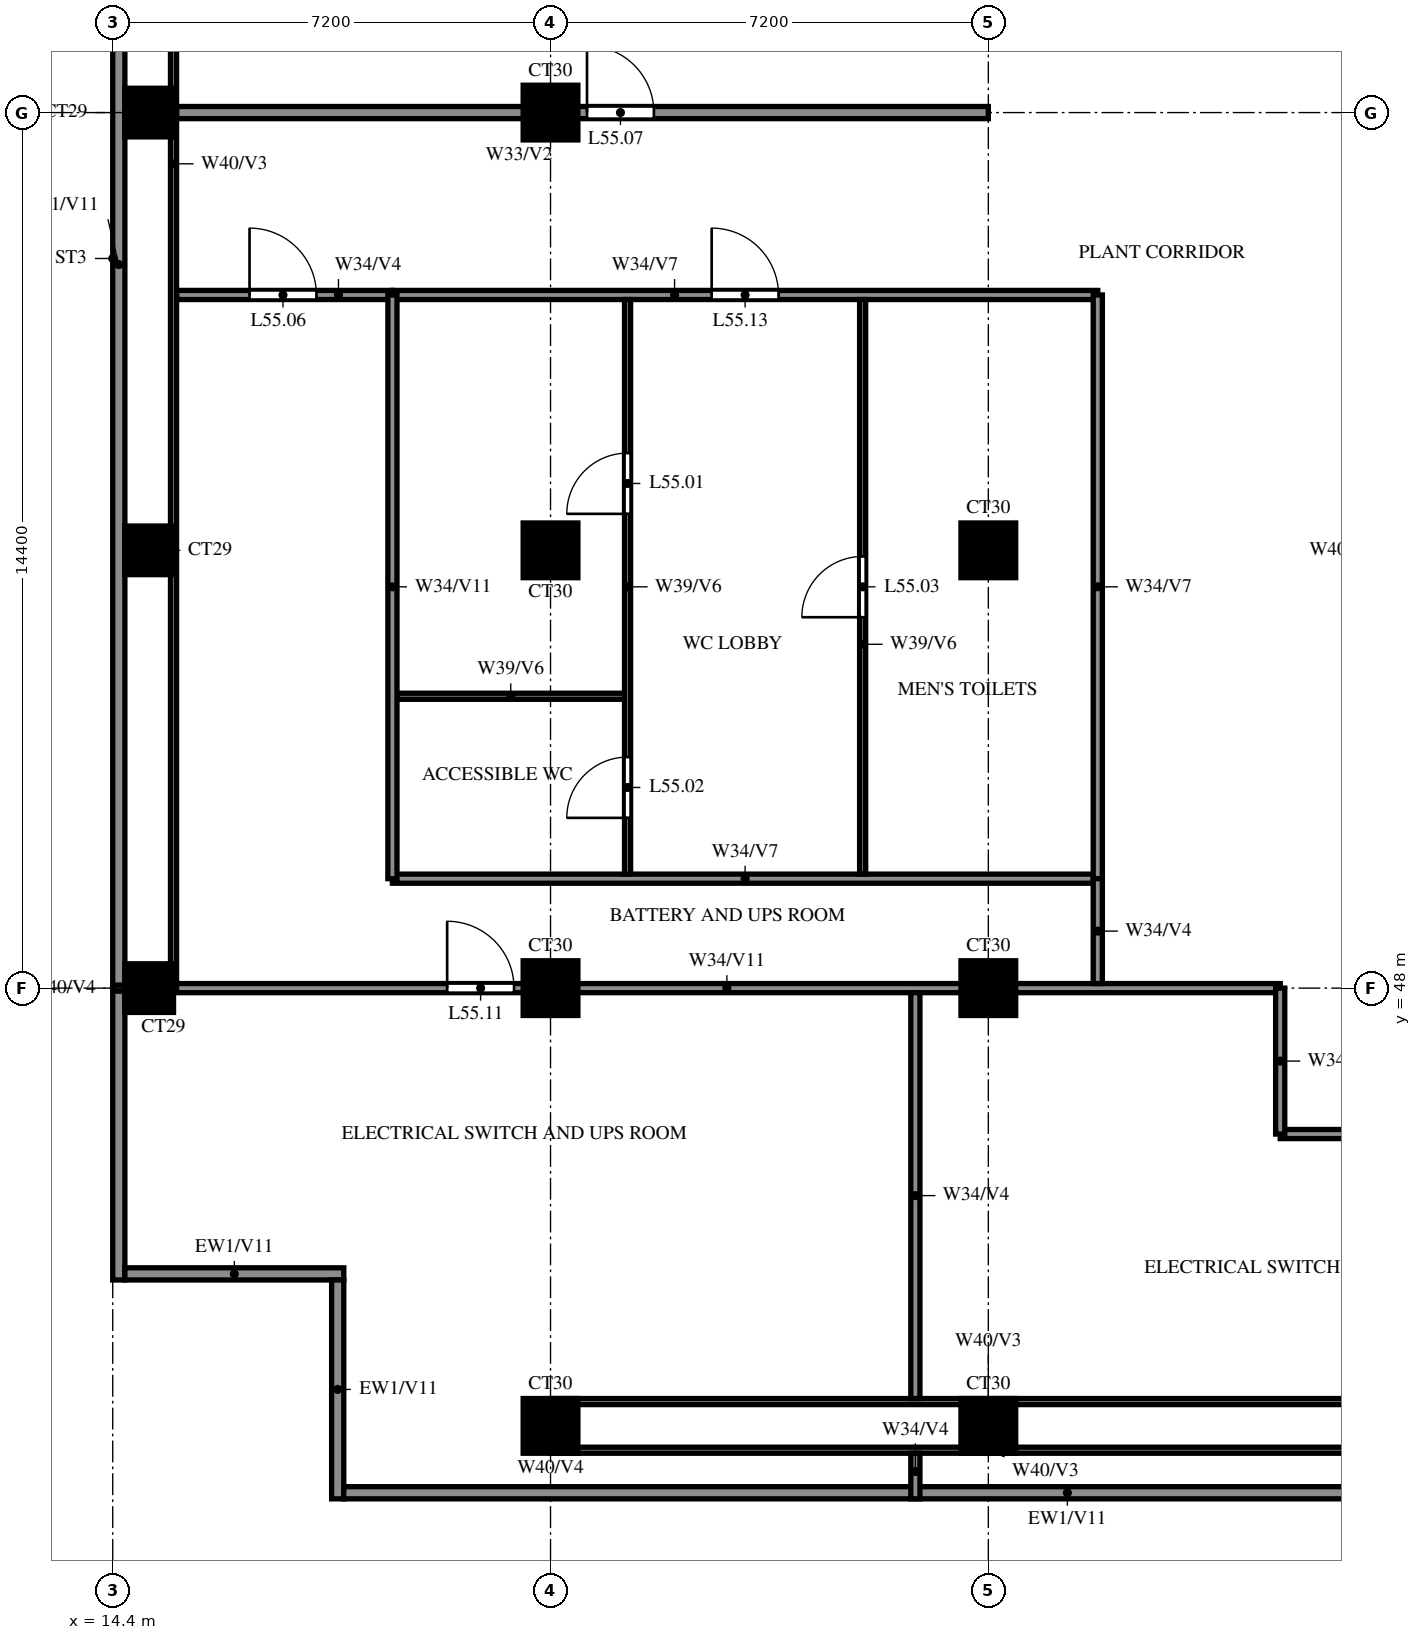
"""IFC4 building model, lengths in metres.
Left out: names, types, materials, properties, quantities, classifications, styles, units other than length and angle.
Written with IfcOpenShell. Run it as: python <this file> out.ifc"""

import sys

from ifc_helpers import new_model, si_unit, direction, frame, frame_2d, origin, origin_2d, place, context, subcontext, project, spatial, rectangle, extrude, source, transform, mapped, element, fill, save


model = new_model("IFC4")
c1 = context("Model", 3, precision=1e-05, world=origin(), true_north=direction((0.0, 1.0)))
c2 = subcontext(c1, "Body", "Model", "MODEL_VIEW")
j1 = project(units=[si_unit("LENGTHUNIT", "METRE"), si_unit("PLANEANGLEUNIT", "RADIAN")], contexts=[c1])
p1 = place(None, origin())
s1 = spatial("IfcSite", under=j1, at=p1, CompositionType="ELEMENT")
p2 = place(p1, origin())
s2 = spatial("IfcBuilding", under=s1, at=p2, CompositionType="ELEMENT")
p3 = place(p2, frame((0.0, 0.0, 206.0)))
s3 = spatial("IfcBuildingStorey", under=s2, at=p3, CompositionType="ELEMENT", Elevation=206.0)
m1 = source(origin(), c2, "Body", "SweptSolid", [
    extrude(rectangle(XDim=0.9, YDim=0.9, at=origin_2d()), origin(), (0.0, 0.0, 1.0), 5.22),
])
for number, where, z_axis, x_axis in (
    (1, (21.6, 40.8, 0.0), (0.0, 0.0, 1.0), (1.0, 0.0, 0.0)),
    (2, (28.8, 40.8, 0.0), (0.0, 0.0, 1.0), (1.0, 0.0, 0.0)),
):
    element("IfcColumn", number, at=place(p3, frame(where, z_axis=z_axis, x_axis=x_axis)), inside=s3, PredefinedType="COLUMN", context=c2, shape_type="MappedRepresentation", body=[
        mapped(m1, transform((0.0, 0.0, 0.0))),
    ])
m2 = source(origin(), c2, "Body", "SweptSolid", [
    extrude(rectangle(XDim=0.8, YDim=0.8, at=origin_2d()), origin(), (0.0, 0.0, 1.0), 5.22),
])
p4 = place(p3, frame((15.0, 48.0, 0.0), z_axis=(0.0, 0.0, 1.0), x_axis=(1.0, 0.0, 0.0)))
e3 = element("IfcColumn", 3, at=p4, inside=s3, PredefinedType="COLUMN", context=c2, shape_type="MappedRepresentation", body=[
    mapped(m2, transform((0.0, 0.0, 0.0))),
])
for number, where, z_axis, x_axis in (
    (4, (21.6, 48.0, 0.0), (0.0, 0.0, 1.0), (1.0, 0.0, 0.0)),
    (5, (28.8, 48.0, 0.0), (0.0, 0.0, 1.0), (1.0, 0.0, 0.0)),
):
    element("IfcColumn", number, at=place(p3, frame(where, z_axis=z_axis, x_axis=x_axis)), inside=s3, PredefinedType="COLUMN", context=c2, shape_type="MappedRepresentation", body=[
        mapped(m1, transform((0.0, 0.0, 0.0))),
    ])
p5 = place(p3, frame((15.0, 55.2, 0.0), z_axis=(0.0, 0.0, 1.0), x_axis=(1.0, 0.0, 0.0)))
e6 = element("IfcColumn", 6, at=p5, inside=s3, PredefinedType="COLUMN", context=c2, shape_type="MappedRepresentation", body=[
    mapped(m2, transform((0.0, 0.0, 0.0))),
])
for number, where, z_axis, x_axis in (
    (7, (21.6, 55.2, 0.0), (0.0, 0.0, 1.0), (1.0, 0.0, 0.0)),
    (8, (28.8, 55.2, 0.0), (0.0, 0.0, 1.0), (1.0, 0.0, 0.0)),
):
    element("IfcColumn", number, at=place(p3, frame(where, z_axis=z_axis, x_axis=x_axis)), inside=s3, PredefinedType="COLUMN", context=c2, shape_type="MappedRepresentation", body=[
        mapped(m1, transform((0.0, 0.0, 0.0))),
    ])
p6 = place(p3, frame((15.0, 62.4, 0.0), z_axis=(0.0, 0.0, 1.0), x_axis=(1.0, 0.0, 0.0)))
e9 = element("IfcColumn", 9, at=p6, inside=s3, PredefinedType="COLUMN", context=c2, shape_type="MappedRepresentation", body=[
    mapped(m2, transform((0.0, 0.0, 0.0))),
])
p7 = place(p3, frame((21.6, 62.4, 0.0), z_axis=(0.0, 0.0, 1.0), x_axis=(1.0, 0.0, 0.0)))
e10 = element("IfcColumn", 10, at=p7, inside=s3, PredefinedType="COLUMN", context=c2, shape_type="MappedRepresentation", body=[
    mapped(m1, transform((0.0, 0.0, 0.0))),
])
p8 = place(p3, frame((14.5, 76.6, 0.0), z_axis=(0.0, 0.0, 1.0), x_axis=(0.0, -1.0, 0.0)))
e11 = element("IfcWall", 11, at=p8, inside=s3, PredefinedType="SOLIDWALL", context=c2, shape_type="SweptSolid", body=[
    extrude(rectangle(XDim=33.4, YDim=0.2, at=frame_2d((16.7, 0.0))), origin(), (0.0, 0.0, 1.0), 5.22),
])
for number, where, z_axis, x_axis in (
    (12, (14.6, 43.3, 0.0), (0.0, 0.0, 1.0), (1.0, 0.0, 0.0)),
    (13, (18.1, 43.2, 0.0), (0.0, 0.0, 1.0), (0.0, -1.0, 0.0)),
):
    element("IfcWall", number, at=place(p3, frame(where, z_axis=z_axis, x_axis=x_axis)), inside=s3, PredefinedType="SOLIDWALL", context=c2, shape_type="SweptSolid", body=[
        extrude(rectangle(XDim=3.6, YDim=0.2, at=frame_2d((1.8, 0.0))), origin(), (0.0, 0.0, 1.0), 5.22),
    ])
p9 = place(p3, frame((18.2, 39.7, 0.0), z_axis=(0.0, 0.0, 1.0), x_axis=(1.0, 0.0, 0.0)))
e14 = element("IfcWall", 14, at=p9, inside=s3, PredefinedType="SOLIDWALL", context=c2, shape_type="SweptSolid", body=[
    extrude(rectangle(XDim=23.8, YDim=0.2, at=frame_2d((11.9, 0.0))), origin(), (0.0, 0.0, 1.0), 5.22),
])
for number, where, z_axis, x_axis in (
    (15, (21.6, 40.4, 0.0), (0.0, 0.0, 1.0), (1.0, 0.0, 0.0)),
    (16, (21.6, 41.2, 0.0), (0.0, 0.0, 1.0), (1.0, 0.0, 0.0)),
):
    element("IfcWall", number, at=place(p3, frame(where, z_axis=z_axis, x_axis=x_axis)), inside=s3, PredefinedType="PARTITIONING", context=c2, shape_type="SweptSolid", body=[
        extrude(rectangle(XDim=14.4, YDim=0.1, at=frame_2d((7.2, 0.0))), origin(), (0.0, 0.0, 1.0), 3.72),
    ])
p10 = place(p3, frame((33.6, 45.6, 0.0), z_axis=(0.0, 0.0, 1.0), x_axis=(1.0, 0.0, 0.0)))
e17 = element("IfcWall", 17, at=p10, inside=s3, PredefinedType="PARTITIONING", context=c2, shape_type="SweptSolid", body=[
    extrude(rectangle(XDim=7.2, YDim=0.15, at=frame_2d((3.6, 0.0))), origin(), (0.0, 0.0, 1.0), 5.22),
])
p11 = place(p10, frame((3.05, 0.0, 0.0)))
e18 = element("IfcOpeningElement", 18, at=p11, cuts=e17, PredefinedType="OPENING", context=c2, shape_type="SweptSolid", body=[
    extrude(rectangle(XDim=1.1, YDim=2.1, at=frame_2d((0.55, 1.05))), frame((0.0, 0.085, 0.0), z_axis=(0.0, -1.0, 0.0), x_axis=(1.0, 0.0, 0.0)), (0.0, 0.0, 1.0), 0.17),
])
p12 = place(p10, frame((1.85, 0.0, 0.0)))
e19 = element("IfcOpeningElement", 19, at=p12, cuts=e17, PredefinedType="OPENING", context=c2, shape_type="SweptSolid", body=[
    extrude(rectangle(XDim=1.1, YDim=2.1, at=frame_2d((0.55, 1.05))), frame((0.0, 0.085, 0.0), z_axis=(0.0, -1.0, 0.0), x_axis=(1.0, 0.0, 0.0)), (0.0, 0.0, 1.0), 0.17),
])
p13 = place(p3, frame((14.4, 48.0, 0.0), z_axis=(0.0, 0.0, 1.0), x_axis=(1.0, 0.0, 0.0)))
e20 = element("IfcWall", 20, at=p13, inside=s3, PredefinedType="PARTITIONING", context=c2, shape_type="SweptSolid", body=[
    extrude(rectangle(XDim=1.0, YDim=0.1, at=frame_2d((0.5, 0.0))), origin(), (0.0, 0.0, 1.0), 5.22),
])
p14 = place(p3, frame((15.4, 48.0, 0.0), z_axis=(0.0, 0.0, 1.0), x_axis=(1.0, 0.0, 0.0)))
e21 = element("IfcWall", 21, at=p14, inside=s3, PredefinedType="PARTITIONING", context=c2, shape_type="SweptSolid", body=[
    extrude(rectangle(XDim=18.2, YDim=0.15, at=frame_2d((9.1, 0.0))), origin(), (0.0, 0.0, 1.0), 3.72),
])
p15 = place(p14, frame((4.5, 0.0, 0.0)))
e22 = element("IfcOpeningElement", 22, at=p15, cuts=e21, PredefinedType="OPENING", context=c2, shape_type="SweptSolid", body=[
    extrude(rectangle(XDim=1.1, YDim=2.1, at=frame_2d((0.55, 1.05))), frame((0.0, 0.085, 0.0), z_axis=(0.0, -1.0, 0.0), x_axis=(1.0, 0.0, 0.0)), (0.0, 0.0, 1.0), 0.17),
])
p16 = place(p3, frame((19.0, 49.8, 0.0), z_axis=(0.0, 0.0, 1.0), x_axis=(1.0, 0.0, 0.0)))
e23 = element("IfcWall", 23, at=p16, inside=s3, PredefinedType="PARTITIONING", context=c2, shape_type="SweptSolid", body=[
    extrude(rectangle(XDim=11.6, YDim=0.15, at=frame_2d((5.8, 0.0))), origin(), (0.0, 0.0, 1.0), 4.32),
])
p17 = place(p3, frame((19.075, 52.8, 0.0), z_axis=(0.0, 0.0, 1.0), x_axis=(1.0, 0.0, 0.0)))
e24 = element("IfcWall", 24, at=p17, inside=s3, PredefinedType="PARTITIONING", context=c2, shape_type="SweptSolid", body=[
    extrude(rectangle(XDim=3.742, YDim=0.1, at=frame_2d((1.871, 0.0))), origin(), (0.0, 0.0, 1.0), 4.32),
])
p18 = place(p3, frame((19.0, 59.4, 0.0), z_axis=(0.0, 0.0, 1.0), x_axis=(1.0, 0.0, 0.0)))
e25 = element("IfcWall", 25, at=p18, inside=s3, PredefinedType="PARTITIONING", context=c2, shape_type="SweptSolid", body=[
    extrude(rectangle(XDim=11.6, YDim=0.15, at=frame_2d((5.8, 0.0))), origin(), (0.0, 0.0, 1.0), 4.32),
])
p19 = place(p18, frame((5.25, 0.0, 0.0)))
e26 = element("IfcOpeningElement", 26, at=p19, cuts=e25, PredefinedType="OPENING", context=c2, shape_type="SweptSolid", body=[
    extrude(rectangle(XDim=1.1, YDim=2.1, at=frame_2d((0.55, 1.05))), frame((0.0, 0.085, 0.0), z_axis=(0.0, -1.0, 0.0), x_axis=(1.0, 0.0, 0.0)), (0.0, 0.0, 1.0), 0.17),
])
p20 = place(p3, frame((15.45, 59.4, 0.0), z_axis=(0.0, 0.0, 1.0), x_axis=(1.0, 0.0, 0.0)))
e27 = element("IfcWall", 27, at=p20, inside=s3, PredefinedType="PARTITIONING", context=c2, shape_type="SweptSolid", body=[
    extrude(rectangle(XDim=3.55, YDim=0.15, at=frame_2d((1.775, 0.0))), origin(), (0.0, 0.0, 1.0), 5.22),
])
p21 = place(p20, frame((1.2, 0.0, 0.0)))
e28 = element("IfcOpeningElement", 28, at=p21, cuts=e27, PredefinedType="OPENING", context=c2, shape_type="SweptSolid", body=[
    extrude(rectangle(XDim=1.1, YDim=2.1, at=frame_2d((0.55, 1.05))), frame((0.0, 0.085, 0.0), z_axis=(0.0, -1.0, 0.0), x_axis=(1.0, 0.0, 0.0)), (0.0, 0.0, 1.0), 0.17),
])
p22 = place(p3, frame((15.45, 62.4, 0.0), z_axis=(0.0, 0.0, 1.0), x_axis=(1.0, 0.0, 0.0)))
e29 = element("IfcWall", 29, at=p22, inside=s3, PredefinedType="SOLIDWALL", context=c2, shape_type="SweptSolid", body=[
    extrude(rectangle(XDim=13.35, YDim=0.2, at=frame_2d((6.675, 0.0))), origin(), (0.0, 0.0, 1.0), 3.72),
])
p23 = place(p22, frame((6.75, 0.0, 0.0)))
e30 = element("IfcOpeningElement", 30, at=p23, cuts=e29, PredefinedType="OPENING", context=c2, shape_type="SweptSolid", body=[
    extrude(rectangle(XDim=1.1, YDim=2.1, at=frame_2d((0.55, 1.05))), frame((0.0, 0.11, 0.0), z_axis=(0.0, -1.0, 0.0), x_axis=(1.0, 0.0, 0.0)), (0.0, 0.0, 1.0), 0.22),
])
p24 = place(p3, frame((15.4, 48.0, 0.0), z_axis=(0.0, 0.0, 1.0), x_axis=(0.0, 1.0, 0.0)))
e31 = element("IfcWall", 31, at=p24, inside=s3, PredefinedType="PARTITIONING", context=c2, shape_type="SweptSolid", body=[
    extrude(rectangle(XDim=28.542, YDim=0.1, at=frame_2d((14.271, 0.0))), origin(), (0.0, 0.0, 1.0), 3.72),
])
p25 = place(p3, frame((19.0, 49.8, 0.0), z_axis=(0.0, 0.0, 1.0), x_axis=(0.0, 1.0, 0.0)))
e32 = element("IfcWall", 32, at=p25, inside=s3, PredefinedType="PARTITIONING", context=c2, shape_type="SweptSolid", body=[
    extrude(rectangle(XDim=9.6, YDim=0.15, at=frame_2d((4.8, 0.0))), origin(), (0.0, 0.0, 1.0), 3.72),
])
p26 = place(p3, frame((21.6, 40.4, 0.0), z_axis=(0.0, 0.0, 1.0), x_axis=(0.0, 1.0, 0.0)))
e33 = element("IfcWall", 33, at=p26, inside=s3, PredefinedType="PARTITIONING", context=c2, shape_type="SweptSolid", body=[
    extrude(rectangle(XDim=0.8, YDim=0.1, at=frame_2d((0.4, 0.0))), origin(), (0.0, 0.0, 1.0), 5.22),
])
p27 = place(p3, frame((22.867, 49.875, 0.0), z_axis=(0.0, 0.0, 1.0), x_axis=(0.0, 1.0, 0.0)))
e34 = element("IfcWall", 34, at=p27, inside=s3, PredefinedType="PARTITIONING", context=c2, shape_type="SweptSolid", body=[
    extrude(rectangle(XDim=9.45, YDim=0.1, at=frame_2d((4.725, 0.0))), origin(), (0.0, 0.0, 1.0), 4.32),
])
p28 = place(p27, frame((5.925, 0.0, 0.0)))
e35 = element("IfcOpeningElement", 35, at=p28, cuts=e34, PredefinedType="OPENING", context=c2, shape_type="SweptSolid", body=[
    extrude(rectangle(XDim=1.0, YDim=2.1, at=frame_2d((0.5, 1.05))), frame((0.0, 0.06, 0.0), z_axis=(0.0, -1.0, 0.0), x_axis=(1.0, 0.0, 0.0)), (0.0, 0.0, 1.0), 0.12),
])
p29 = place(p27, frame((0.925, 0.0, 0.0)))
e36 = element("IfcOpeningElement", 36, at=p29, cuts=e34, PredefinedType="OPENING", context=c2, shape_type="SweptSolid", body=[
    extrude(rectangle(XDim=1.0, YDim=2.1, at=frame_2d((0.5, 1.05))), frame((0.0, 0.06, 0.0), z_axis=(0.0, -1.0, 0.0), x_axis=(1.0, 0.0, 0.0)), (0.0, 0.0, 1.0), 0.12),
])
p30 = place(p3, frame((26.733, 49.875, 0.0), z_axis=(0.0, 0.0, 1.0), x_axis=(0.0, 1.0, 0.0)))
e37 = element("IfcWall", 37, at=p30, inside=s3, PredefinedType="PARTITIONING", context=c2, shape_type="SweptSolid", body=[
    extrude(rectangle(XDim=9.45, YDim=0.1, at=frame_2d((4.725, 0.0))), origin(), (0.0, 0.0, 1.0), 4.32),
])
p31 = place(p30, frame((4.225, 0.0, 0.0)))
e38 = element("IfcOpeningElement", 38, at=p31, cuts=e37, PredefinedType="OPENING", context=c2, shape_type="SweptSolid", body=[
    extrude(rectangle(XDim=1.0, YDim=2.1, at=frame_2d((0.5, 1.05))), frame((0.0, 0.06, 0.0), z_axis=(0.0, -1.0, 0.0), x_axis=(1.0, 0.0, 0.0)), (0.0, 0.0, 1.0), 0.12),
])
p32 = place(p3, frame((27.6, 39.6, 0.0), z_axis=(0.0, 0.0, 1.0), x_axis=(0.0, 1.0, 0.0)))
e39 = element("IfcWall", 39, at=p32, inside=s3, PredefinedType="PARTITIONING", context=c2, shape_type="SweptSolid", body=[
    extrude(rectangle(XDim=0.75, YDim=0.15, at=frame_2d((0.375, 0.0))), origin(), (0.0, 0.0, 1.0), 5.22),
])
p33 = place(p3, frame((27.6, 41.25, 0.0), z_axis=(0.0, 0.0, 1.0), x_axis=(0.0, 1.0, 0.0)))
e40 = element("IfcWall", 40, at=p33, inside=s3, PredefinedType="PARTITIONING", context=c2, shape_type="SweptSolid", body=[
    extrude(rectangle(XDim=6.675, YDim=0.15, at=frame_2d((3.337, 0.0))), origin(), (0.0, 0.0, 1.0), 5.22),
])
p34 = place(p3, frame((30.6, 49.8, 0.0), z_axis=(0.0, 0.0, 1.0), x_axis=(0.0, 1.0, 0.0)))
e41 = element("IfcWall", 41, at=p34, inside=s3, PredefinedType="PARTITIONING", context=c2, shape_type="SweptSolid", body=[
    extrude(rectangle(XDim=9.6, YDim=0.15, at=frame_2d((4.8, 0.0))), origin(), (0.0, 0.0, 1.0), 4.32),
])
p35 = place(p3, frame((30.6, 48.075, 0.0), z_axis=(0.0, 0.0, 1.0), x_axis=(0.0, 1.0, 0.0)))
e42 = element("IfcWall", 42, at=p35, inside=s3, PredefinedType="PARTITIONING", context=c2, shape_type="SweptSolid", body=[
    extrude(rectangle(XDim=1.725, YDim=0.15, at=frame_2d((0.863, 0.0))), origin(), (0.0, 0.0, 1.0), 5.22),
])
p36 = place(p3, frame((33.6, 45.6, 0.0), z_axis=(0.0, 0.0, 1.0), x_axis=(0.0, 1.0, 0.0)))
e43 = element("IfcWall", 43, at=p36, inside=s3, PredefinedType="PARTITIONING", context=c2, shape_type="SweptSolid", body=[
    extrude(rectangle(XDim=2.4, YDim=0.15, at=frame_2d((1.2, 0.0))), origin(), (0.0, 0.0, 1.0), 4.32),
])
p37 = place(p28, origin())
e44 = element("IfcDoor", 44, at=p37, inside=s3, OperationType="SINGLE_SWING_RIGHT", PredefinedType="DOOR", context=c2, shape_type="SweptSolid", body=[
    extrude(rectangle(XDim=1.0, YDim=2.1, at=frame_2d((0.5, 1.05))), frame((0.0, 0.025, 0.0), z_axis=(0.0, -1.0, 0.0), x_axis=(1.0, 0.0, 0.0)), (0.0, 0.0, 1.0), 0.05),
])
fill(e35, e44)
p38 = place(p29, origin())
e45 = element("IfcDoor", 45, at=p38, inside=s3, OperationType="SINGLE_SWING_LEFT", PredefinedType="DOOR", context=c2, shape_type="SweptSolid", body=[
    extrude(rectangle(XDim=1.0, YDim=2.1, at=frame_2d((0.5, 1.05))), frame((0.0, 0.025, 0.0), z_axis=(0.0, -1.0, 0.0), x_axis=(1.0, 0.0, 0.0)), (0.0, 0.0, 1.0), 0.05),
])
fill(e36, e45)
p39 = place(p31, origin())
e46 = element("IfcDoor", 46, at=p39, inside=s3, OperationType="SINGLE_SWING_LEFT", PredefinedType="DOOR", context=c2, shape_type="SweptSolid", body=[
    extrude(rectangle(XDim=1.0, YDim=2.1, at=frame_2d((0.5, 1.05))), frame((0.0, 0.025, 0.0), z_axis=(0.0, -1.0, 0.0), x_axis=(1.0, 0.0, 0.0)), (0.0, 0.0, 1.0), 0.05),
])
fill(e38, e46)
p40 = place(p21, origin())
e47 = element("IfcDoor", 47, at=p40, inside=s3, OperationType="SINGLE_SWING_LEFT", PredefinedType="DOOR", context=c2, shape_type="SweptSolid", body=[
    extrude(rectangle(XDim=1.1, YDim=2.1, at=frame_2d((0.55, 1.05))), frame((0.0, 0.025, 0.0), z_axis=(0.0, -1.0, 0.0), x_axis=(1.0, 0.0, 0.0)), (0.0, 0.0, 1.0), 0.05),
])
fill(e28, e47)
p41 = place(p23, origin())
e48 = element("IfcDoor", 48, at=p41, inside=s3, OperationType="SINGLE_SWING_RIGHT", PredefinedType="DOOR", context=c2, shape_type="SweptSolid", body=[
    extrude(rectangle(XDim=1.1, YDim=2.1, at=frame_2d((0.55, 1.05))), frame((0.0, 0.025, 0.0), z_axis=(0.0, -1.0, 0.0), x_axis=(1.0, 0.0, 0.0)), (0.0, 0.0, 1.0), 0.05),
])
fill(e30, e48)
p42 = place(p15, origin())
e49 = element("IfcDoor", 49, at=p42, inside=s3, OperationType="SINGLE_SWING_LEFT", PredefinedType="DOOR", context=c2, shape_type="SweptSolid", body=[
    extrude(rectangle(XDim=1.1, YDim=2.1, at=frame_2d((0.55, 1.05))), frame((0.0, 0.025, 0.0), z_axis=(0.0, -1.0, 0.0), x_axis=(1.0, 0.0, 0.0)), (0.0, 0.0, 1.0), 0.05),
])
fill(e22, e49)
p43 = place(p19, origin())
e50 = element("IfcDoor", 50, at=p43, inside=s3, OperationType="SINGLE_SWING_RIGHT", PredefinedType="DOOR", context=c2, shape_type="SweptSolid", body=[
    extrude(rectangle(XDim=1.1, YDim=2.1, at=frame_2d((0.55, 1.05))), frame((0.0, 0.025, 0.0), z_axis=(0.0, -1.0, 0.0), x_axis=(1.0, 0.0, 0.0)), (0.0, 0.0, 1.0), 0.05),
])
fill(e26, e50)
save(model, sys.argv[1])
